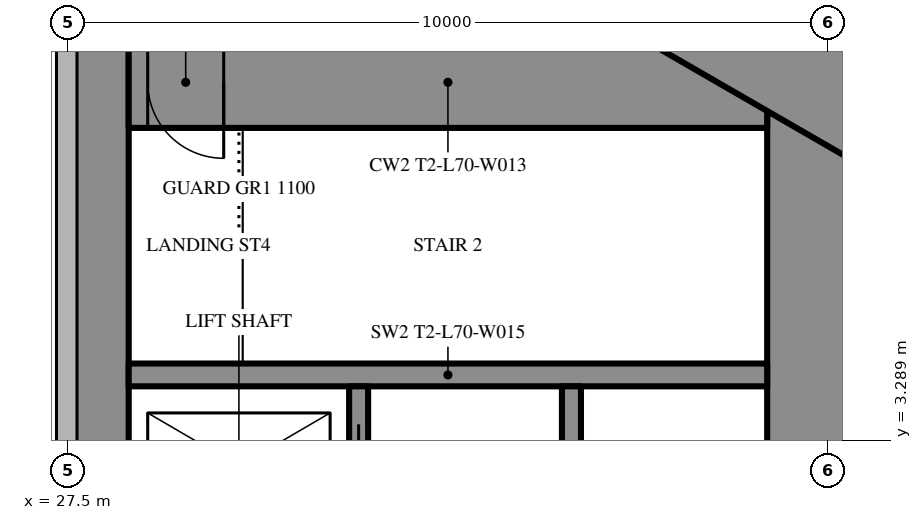
"""IFC4 building model, lengths in metres.
Left out: names, types, materials, properties, quantities, classifications, styles, units other than length and angle.
Written with IfcOpenShell. Run it as: python <this file> out.ifc"""

import sys

from ifc_helpers import new_model, si_unit, direction, frame, frame_2d, origin, place, context, subcontext, project, spatial, rectangle, extrude, element, fill, save


model = new_model("IFC4")
c1 = context("Model", 3, precision=1e-05, world=origin(), true_north=direction((0.0, 1.0)))
c2 = subcontext(c1, "Body", "Model", "MODEL_VIEW")
j1 = project(units=[si_unit("LENGTHUNIT", "METRE"), si_unit("PLANEANGLEUNIT", "RADIAN")], contexts=[c1])
p1 = place(None, origin())
s1 = spatial("IfcSite", under=j1, at=p1, CompositionType="ELEMENT")
p2 = place(p1, origin())
s2 = spatial("IfcBuilding", under=s1, at=p2, CompositionType="ELEMENT")
p3 = place(p2, frame((0.0, 0.0, 268.3)))
s3 = spatial("IfcBuildingStorey", under=s2, at=p3, CompositionType="ELEMENT", Elevation=268.3)
p4 = place(p3, frame((27.9, -8.6, 0.0), z_axis=(0.0, 0.0, 1.0), x_axis=(0.0, 1.0, 0.0)))
e1 = element("IfcWall", 1, at=p4, inside=s3, PredefinedType="SHEAR", context=c2, shape_type="SweptSolid", body=[
    extrude(rectangle(XDim=17.2, YDim=0.8, at=frame_2d((8.6, 0.0))), origin(), (0.0, 0.0, 1.0), 5.0),
])
p5 = place(p4, frame((9.35, 0.0, 0.0)))
e2 = element("IfcOpeningElement", 2, at=p5, cuts=e1, PredefinedType="OPENING", context=c2, shape_type="SweptSolid", body=[
    extrude(rectangle(XDim=0.9, YDim=2.2, at=frame_2d((0.45, 1.1))), frame((0.0, 0.41, 0.0), z_axis=(0.0, -1.0, 0.0), x_axis=(1.0, 0.0, 0.0)), (0.0, 0.0, 1.0), 0.82),
])
p6 = place(p3, frame((37.3, -8.6, 0.0), z_axis=(0.0, 0.0, 1.0), x_axis=(0.0, 1.0, 0.0)))
e3 = element("IfcWall", 3, at=p6, inside=s3, PredefinedType="SHEAR", context=c2, shape_type="SweptSolid", body=[
    extrude(rectangle(XDim=17.2, YDim=1.2, at=frame_2d((8.6, 0.0))), origin(), (0.0, 0.0, 1.0), 5.0),
])
p7 = place(p6, frame((7.7, 0.0, 0.0)))
e4 = element("IfcOpeningElement", 4, at=p7, cuts=e3, PredefinedType="OPENING", context=c2, shape_type="SweptSolid", body=[
    extrude(rectangle(XDim=1.8, YDim=2.2, at=frame_2d((0.9, 1.1))), frame((0.0, 0.61, 0.0), z_axis=(0.0, -1.0, 0.0), x_axis=(1.0, 0.0, 0.0)), (0.0, 0.0, 1.0), 1.22),
])
p8 = place(p3, frame((28.3, 8.0, 0.0), z_axis=(0.0, 0.0, 1.0), x_axis=(1.0, 0.0, 0.0)))
e5 = element("IfcWall", 5, at=p8, inside=s3, PredefinedType="SHEAR", context=c2, shape_type="SweptSolid", body=[
    extrude(rectangle(XDim=8.4, YDim=1.2, at=frame_2d((4.2, 0.0))), origin(), (0.0, 0.0, 1.0), 5.0),
])
p9 = place(p8, frame((0.25, 0.0, 0.0)))
e6 = element("IfcOpeningElement", 6, at=p9, cuts=e5, PredefinedType="OPENING", context=c2, shape_type="SweptSolid", body=[
    extrude(rectangle(XDim=1.0, YDim=2.2, at=frame_2d((0.5, 1.1))), frame((0.0, 0.61, 0.0), z_axis=(0.0, -1.0, 0.0), x_axis=(1.0, 0.0, 0.0)), (0.0, 0.0, 1.0), 1.22),
])
p10 = place(p3, frame((28.3, 4.15, 0.0), z_axis=(0.0, 0.0, 1.0), x_axis=(1.0, 0.0, 0.0)))
e7 = element("IfcWall", 7, at=p10, inside=s3, PredefinedType="SHEAR", context=c2, shape_type="SweptSolid", body=[
    extrude(rectangle(XDim=8.4, YDim=0.3, at=frame_2d((4.2, 0.0))), origin(), (0.0, 0.0, 1.0), 5.0),
])
p11 = place(p3, frame((31.325, 1.9, 0.0), z_axis=(0.0, 0.0, 1.0), x_axis=(0.0, 1.0, 0.0)))
e8 = element("IfcWall", 8, at=p11, inside=s3, PredefinedType="SHEAR", context=c2, shape_type="SweptSolid", body=[
    extrude(rectangle(XDim=2.1, YDim=0.25, at=frame_2d((1.05, 0.0))), origin(), (0.0, 0.0, 1.0), 5.0),
])
p12 = place(p11, frame((0.5, 0.0, 0.0)))
e9 = element("IfcOpeningElement", 9, at=p12, cuts=e8, PredefinedType="OPENING", context=c2, shape_type="SweptSolid", body=[
    extrude(rectangle(XDim=1.1, YDim=2.2, at=frame_2d((0.55, 1.1))), frame((0.0, 0.135, 0.0), z_axis=(0.0, -1.0, 0.0), x_axis=(1.0, 0.0, 0.0)), (0.0, 0.0, 1.0), 0.27),
])
p13 = place(p3, frame((34.125, 1.65, 0.0), z_axis=(0.0, 0.0, 1.0), x_axis=(0.0, 1.0, 0.0)))
e10 = element("IfcWall", 10, at=p13, inside=s3, PredefinedType="SHEAR", context=c2, shape_type="SweptSolid", body=[
    extrude(rectangle(XDim=2.35, YDim=0.25, at=frame_2d((1.175, 0.0))), origin(), (0.0, 0.0, 1.0), 5.0),
])
p14 = place(p3, frame((27.2, 13.8, 0.0), z_axis=(0.0, 0.0, 1.0), x_axis=(0.866024515034, -0.500001539357, 0.0)))
e11 = element("IfcWall", 11, at=p14, inside=s3, PredefinedType="SHEAR", context=c2, shape_type="SweptSolid", body=[
    extrude(rectangle(XDim=26.907, YDim=1.2, at=frame_2d((13.454, 0.0))), origin(), (0.0, 0.0, 1.0), 5.0),
])
p15 = place(p14, frame((4.6, 0.0, 0.0)))
e12 = element("IfcOpeningElement", 12, at=p15, cuts=e11, PredefinedType="OPENING", context=c2, shape_type="SweptSolid", body=[
    extrude(rectangle(XDim=1.0, YDim=2.2, at=frame_2d((0.5, 1.1))), frame((0.0, 0.61, 0.0), z_axis=(0.0, -1.0, 0.0), x_axis=(1.0, 0.0, 0.0)), (0.0, 0.0, 1.0), 1.22),
])
p16 = place(p14, frame((13.395, 0.0, 0.0)))
e13 = element("IfcOpeningElement", 13, at=p16, cuts=e11, PredefinedType="OPENING", context=c2, shape_type="SweptSolid", body=[
    extrude(rectangle(XDim=1.8, YDim=2.2, at=frame_2d((0.9, 1.1))), frame((0.0, 0.61, 0.0), z_axis=(0.0, -1.0, 0.0), x_axis=(1.0, 0.0, 0.0)), (0.0, 0.0, 1.0), 1.22),
])
p17 = place(p3, frame((28.959, 15.44, 0.0), z_axis=(0.0, 0.0, 1.0), x_axis=(0.866027378611, -0.499996579484, 0.0)))
e14 = element("IfcWall", 14, at=p17, inside=s3, PredefinedType="PARTITIONING", context=c2, shape_type="SweptSolid", body=[
    extrude(rectangle(XDim=30.76, YDim=0.2, at=frame_2d((15.38, 0.0))), origin(), (0.0, 0.0, 1.0), 4.7),
])
p18 = place(p17, frame((26.032, 0.0, 0.0)))
e15 = element("IfcOpeningElement", 15, at=p18, cuts=e14, PredefinedType="OPENING", context=c2, shape_type="SweptSolid", body=[
    extrude(rectangle(XDim=2.0, YDim=2.4, at=frame_2d((1.0, 1.2))), frame((0.0, 0.11, 0.0), z_axis=(0.0, -1.0, 0.0), x_axis=(1.0, 0.0, 0.0)), (0.0, 0.0, 1.0), 0.22),
])
p19 = place(p17, frame((20.587, 0.0, 0.0)))
e16 = element("IfcOpeningElement", 16, at=p19, cuts=e14, PredefinedType="OPENING", context=c2, shape_type="SweptSolid", body=[
    extrude(rectangle(XDim=2.0, YDim=2.4, at=frame_2d((1.0, 1.2))), frame((0.0, 0.11, 0.0), z_axis=(0.0, -1.0, 0.0), x_axis=(1.0, 0.0, 0.0)), (0.0, 0.0, 1.0), 0.22),
])
p20 = place(p17, frame((16.704, 0.0, 0.0)))
e17 = element("IfcOpeningElement", 17, at=p20, cuts=e14, PredefinedType="OPENING", context=c2, shape_type="SweptSolid", body=[
    extrude(rectangle(XDim=2.0, YDim=2.4, at=frame_2d((1.0, 1.2))), frame((0.0, 0.11, 0.0), z_axis=(0.0, -1.0, 0.0), x_axis=(1.0, 0.0, 0.0)), (0.0, 0.0, 1.0), 0.22),
])
p21 = place(p17, frame((6.994, 0.0, 0.0)))
e18 = element("IfcOpeningElement", 18, at=p21, cuts=e14, PredefinedType="OPENING", context=c2, shape_type="SweptSolid", body=[
    extrude(rectangle(XDim=2.0, YDim=2.4, at=frame_2d((1.0, 1.2))), frame((0.0, 0.11, 0.0), z_axis=(0.0, -1.0, 0.0), x_axis=(1.0, 0.0, 0.0)), (0.0, 0.0, 1.0), 0.22),
])
p22 = place(p9, origin())
e19 = element("IfcDoor", 19, at=p22, inside=s3, OperationType="SINGLE_SWING_RIGHT", PredefinedType="DOOR", context=c2, shape_type="SweptSolid", body=[
    extrude(rectangle(XDim=1.0, YDim=2.2, at=frame_2d((0.5, 1.1))), frame((0.0, 0.025, 0.0), z_axis=(0.0, -1.0, 0.0), x_axis=(1.0, 0.0, 0.0)), (0.0, 0.0, 1.0), 0.05),
])
fill(e6, e19)
p23 = place(p12, origin())
e20 = element("IfcDoor", 20, at=p23, inside=s3, OperationType="SLIDING_TO_LEFT", PredefinedType="USERDEFINED", context=c2, shape_type="SweptSolid", body=[
    extrude(rectangle(XDim=1.1, YDim=2.2, at=frame_2d((0.55, 1.1))), frame((0.0, 0.025, 0.0), z_axis=(0.0, -1.0, 0.0), x_axis=(1.0, 0.0, 0.0)), (0.0, 0.0, 1.0), 0.05),
])
fill(e9, e20)
save(model, sys.argv[1])
